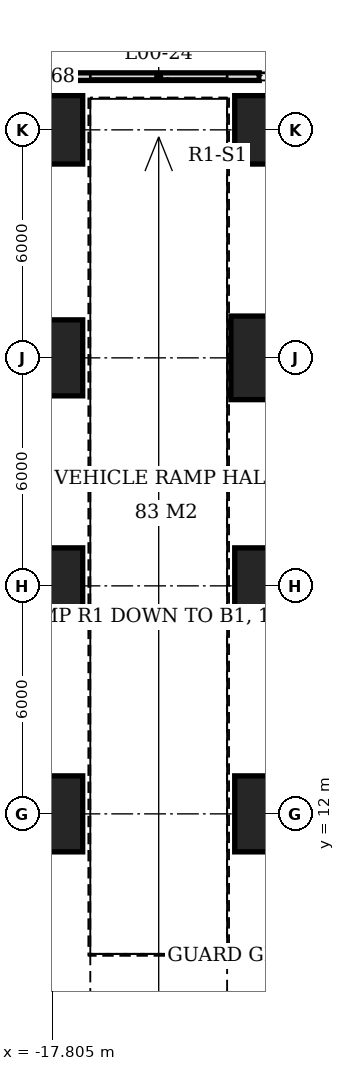
"""IFC4 building model, lengths in metres.
Left out: names, types, materials, properties, quantities, classifications, styles, units other than length and angle.
Written with IfcOpenShell. Run it as: python <this file> out.ifc"""

import sys

from ifc_helpers import new_model, si_unit, direction, frame, frame_2d, origin, origin_2d, place, context, subcontext, project, spatial, rectangle, extrude, element, fill, save


model = new_model("IFC4")
c1 = context("Model", 3, precision=1e-05, world=origin(), true_north=direction((0.0, 1.0)))
c2 = subcontext(c1, "Body", "Model", "MODEL_VIEW")
j1 = project(units=[si_unit("LENGTHUNIT", "METRE"), si_unit("PLANEANGLEUNIT", "RADIAN")], contexts=[c1])
p1 = place(None, origin())
s1 = spatial("IfcSite", under=j1, at=p1, CompositionType="ELEMENT")
p2 = place(p1, origin())
s2 = spatial("IfcBuilding", under=s1, at=p2, CompositionType="ELEMENT")
p3 = place(p2, origin())
s3 = spatial("IfcBuildingStorey", under=s2, at=p3, CompositionType="ELEMENT", Elevation=0.0)
for number, where, z_axis, x_axis in (
    (1, (-18.0, 12.0, 0.0), (0.0, 0.0, 1.0), (1.0, 0.0, 0.0)),
    (2, (-18.0, 18.0, 0.0), (0.0, 0.0, 1.0), (1.0, 0.0, 0.0)),
):
    element("IfcColumn", number, at=place(p3, frame(where, z_axis=z_axis, x_axis=x_axis)), inside=s3, PredefinedType="COLUMN", context=c2, shape_type="SweptSolid", body=[
        extrude(rectangle(XDim=2.0, YDim=2.0, at=origin_2d()), origin(), (0.0, 0.0, 1.0), 6.0),
    ])
p4 = place(p3, frame((-18.0, 24.0, -0.45), z_axis=(0.0, 0.0, 1.0), x_axis=(1.0, 0.0, 0.0)))
e3 = element("IfcColumn", 3, at=p4, inside=s3, PredefinedType="COLUMN", context=c2, shape_type="SweptSolid", body=[
    extrude(rectangle(XDim=2.0, YDim=2.0, at=origin_2d()), origin(), (0.0, 0.0, 1.0), 6.45),
])
p5 = place(p3, frame((-18.0, 30.0, -0.45), z_axis=(0.0, 0.0, 1.0), x_axis=(1.0, 0.0, 0.0)))
e4 = element("IfcColumn", 4, at=p5, inside=s3, PredefinedType="COLUMN", context=c2, shape_type="SweptSolid", body=[
    extrude(rectangle(XDim=2.0, YDim=1.8, at=origin_2d()), origin(), (0.0, 0.0, 1.0), 6.45),
])
for number, where, z_axis, x_axis in (
    (5, (-12.0, 12.0, 0.0), (0.0, 0.0, 1.0), (1.0, 0.0, 0.0)),
    (6, (-12.0, 18.0, 0.0), (0.0, 0.0, 1.0), (1.0, 0.0, 0.0)),
):
    element("IfcColumn", number, at=place(p3, frame(where, z_axis=z_axis, x_axis=x_axis)), inside=s3, PredefinedType="COLUMN", context=c2, shape_type="SweptSolid", body=[
        extrude(rectangle(XDim=2.0, YDim=2.0, at=origin_2d()), origin(), (0.0, 0.0, 1.0), 6.0),
    ])
p6 = place(p3, frame((-12.0, 24.0, -0.45), z_axis=(0.0, 0.0, 1.0), x_axis=(1.0, 0.0, 0.0)))
e7 = element("IfcColumn", 7, at=p6, inside=s3, PredefinedType="COLUMN", context=c2, shape_type="SweptSolid", body=[
    extrude(rectangle(XDim=2.2, YDim=2.2, at=origin_2d()), origin(), (0.0, 0.0, 1.0), 6.45),
])
p7 = place(p3, frame((-12.0, 30.0, -0.45), z_axis=(0.0, 0.0, 1.0), x_axis=(1.0, 0.0, 0.0)))
e8 = element("IfcColumn", 8, at=p7, inside=s3, PredefinedType="COLUMN", context=c2, shape_type="SweptSolid", body=[
    extrude(rectangle(XDim=2.0, YDim=1.8, at=origin_2d()), origin(), (0.0, 0.0, 1.0), 6.45),
])
p8 = place(p3, frame((-12.355, 31.4, 0.0), z_axis=(0.0, 0.0, 1.0), x_axis=(-1.0, 0.0, 0.0)))
e9 = element("IfcWall", 9, at=p8, inside=s3, PredefinedType="USERDEFINED", context=c2, shape_type="SweptSolid", body=[
    extrude(rectangle(XDim=6.064, YDim=0.2, at=frame_2d((3.032, 0.0))), origin(), (0.0, 0.0, 1.0), 6.0),
])
p9 = place(p8, frame((0.845, 0.0, 0.0)))
e10 = element("IfcOpeningElement", 10, at=p9, cuts=e9, PredefinedType="OPENING", context=c2, shape_type="SweptSolid", body=[
    extrude(rectangle(XDim=3.6, YDim=3.0, at=frame_2d((1.8, 1.5))), frame((0.0, 0.11, 0.0), z_axis=(0.0, -1.0, 0.0), x_axis=(1.0, 0.0, 0.0)), (0.0, 0.0, 1.0), 0.22),
])
p10 = place(p9, origin())
e11 = element("IfcDoor", 11, at=p10, inside=s3, OperationType="SLIDING_TO_LEFT", PredefinedType="USERDEFINED", context=c2, shape_type="SweptSolid", body=[
    extrude(rectangle(XDim=3.6, YDim=3.0, at=frame_2d((1.8, 1.5))), frame((0.0, 0.025, 0.0), z_axis=(0.0, -1.0, 0.0), x_axis=(1.0, 0.0, 0.0)), (0.0, 0.0, 1.0), 0.05),
])
fill(e10, e11)
save(model, sys.argv[1])
